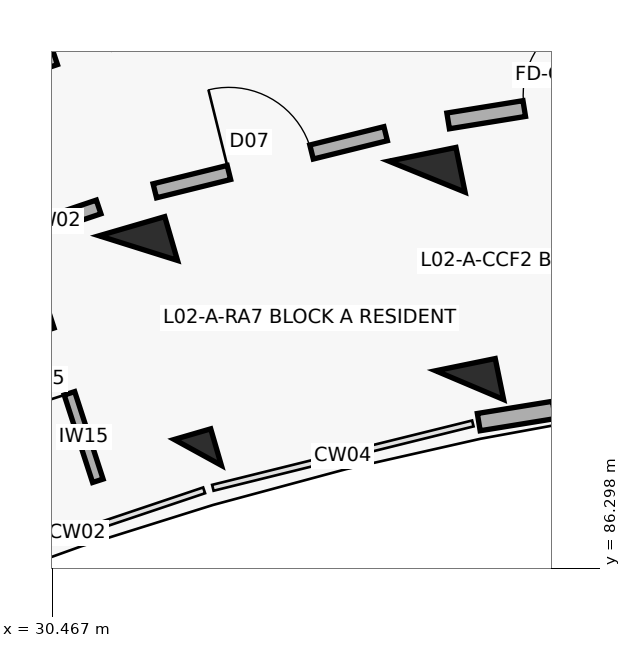
"""IFC4 building model, lengths in metres.
Left out: names, types, materials, properties, quantities, classifications, styles, units other than length and angle.
Written with IfcOpenShell. Run it as: python <this file> out.ifc"""

import sys

from ifc_helpers import new_model, si_unit, direction, frame, frame_2d, origin, origin_2d, place, context, subcontext, project, spatial, rectangle, extrude, element, fill, save


model = new_model("IFC4")
c1 = context("Model", 3, precision=1e-05, world=origin(), true_north=direction((0.0, 1.0)))
c2 = subcontext(c1, "Body", "Model", "MODEL_VIEW")
j1 = project(units=[si_unit("LENGTHUNIT", "METRE"), si_unit("PLANEANGLEUNIT", "RADIAN")], contexts=[c1])
p1 = place(None, origin())
s1 = spatial("IfcSite", under=j1, at=p1, CompositionType="ELEMENT")
p2 = place(p1, origin())
s2 = spatial("IfcBuilding", under=s1, at=p2, CompositionType="ELEMENT")
p3 = place(p2, frame((0.0, 0.0, 8.1)))
s3 = spatial("IfcBuildingStorey", under=s2, at=p3, CompositionType="ELEMENT", Elevation=8.1)
p4 = place(p3, frame((32.382, 87.82, 0.0), z_axis=(0.0, 0.0, 1.0), x_axis=(-0.27966144946, 0.96009867914, 0.0)))
e1 = element("IfcColumn", 1, at=p4, inside=s3, PredefinedType="COLUMN", context=c2, shape_type="SweptSolid", body=[
    extrude(rectangle(XDim=0.5, YDim=0.5, at=origin_2d()), origin(), (0.0, 0.0, 1.0), 3.1),
])
p5 = place(p3, frame((31.599, 90.508, 0.0), z_axis=(0.0, 0.0, 1.0), x_axis=(-0.27966144946, 0.96009867914, 0.0)))
e2 = element("IfcColumn", 2, at=p5, inside=s3, PredefinedType="COLUMN", context=c2, shape_type="SweptSolid", body=[
    extrude(rectangle(XDim=0.6, YDim=0.9, at=origin_2d()), origin(), (0.0, 0.0, 1.0), 3.1),
])
p6 = place(p3, frame((35.958, 88.705, 0.0), z_axis=(0.0, 0.0, 1.0), x_axis=(-0.200393999665, 0.979715389742, 0.0)))
e3 = element("IfcColumn", 3, at=p6, inside=s3, PredefinedType="COLUMN", context=c2, shape_type="SweptSolid", body=[
    extrude(rectangle(XDim=0.55, YDim=0.8, at=origin_2d()), origin(), (0.0, 0.0, 1.0), 3.1),
])
p7 = place(p3, frame((35.397, 91.448, 0.0), z_axis=(0.0, 0.0, 1.0), x_axis=(-0.200393999665, 0.979715389742, 0.0)))
e4 = element("IfcColumn", 4, at=p7, inside=s3, PredefinedType="COLUMN", context=c2, shape_type="SweptSolid", body=[
    extrude(rectangle(XDim=0.6, YDim=0.9, at=origin_2d()), origin(), (0.0, 0.0, 1.0), 3.1),
])
p8 = place(p3, frame((36.078, 88.218, 0.0), z_axis=(0.0, 0.0, 1.0), x_axis=(0.987080874485, 0.160222804952, 0.0)))
e5 = element("IfcWall", 5, at=p8, inside=s3, PredefinedType="SOLIDWALL", context=c2, shape_type="SweptSolid", body=[
    extrude(rectangle(XDim=3.604, YDim=0.23, at=frame_2d((1.802, 0.0))), origin(), (0.0, 0.0, 1.0), 2.25),
])
p9 = place(p8, frame((1.002, 0.0, 0.32)))
e6 = element("IfcOpeningElement", 6, at=p9, cuts=e5, PredefinedType="OPENING", context=c2, shape_type="SweptSolid", body=[
    extrude(rectangle(XDim=1.6, YDim=1.5, at=frame_2d((0.8, 0.75))), frame((0.0, 0.125, 0.0), z_axis=(0.0, -1.0, 0.0), x_axis=(1.0, 0.0, 0.0)), (0.0, 0.0, 1.0), 0.25),
])
p10 = place(p3, frame((27.247, 91.923, 0.0), z_axis=(0.0, 0.0, 1.0), x_axis=(0.947863007629, 0.318678080151, 0.0)))
e7 = element("IfcWall", 7, at=p10, inside=s3, PredefinedType="SOLIDWALL", context=c2, shape_type="SweptSolid", body=[
    extrude(rectangle(XDim=3.436, YDim=0.2, at=frame_2d((1.718, 0.0))), origin(), (0.0, 0.0, 1.0), 2.08),
])
p11 = place(p10, frame((1.228, 0.0, 0.0)))
e8 = element("IfcOpeningElement", 8, at=p11, cuts=e7, PredefinedType="OPENING", context=c2, shape_type="SweptSolid", body=[
    extrude(rectangle(XDim=0.98, YDim=2.15, at=frame_2d((0.49, 1.075))), frame((0.0, 0.11, 0.0), z_axis=(0.0, -1.0, 0.0), x_axis=(1.0, 0.0, 0.0)), (0.0, 0.0, 1.0), 0.22),
])
p12 = place(p3, frame((27.979, 90.008, 0.0), z_axis=(0.0, 0.0, 1.0), x_axis=(0.94787351033, 0.318646839643, 0.0)))
e9 = element("IfcWall", 9, at=p12, inside=s3, PredefinedType="SOLIDWALL", context=c2, shape_type="SweptSolid", body=[
    extrude(rectangle(XDim=3.269, YDim=0.19, at=frame_2d((1.634, 0.0))), origin(), (0.0, 0.0, 1.0), 2.08),
])
p13 = place(p12, frame((1.184, 0.0, 0.0)))
e10 = element("IfcOpeningElement", 10, at=p13, cuts=e9, PredefinedType="OPENING", context=c2, shape_type="SweptSolid", body=[
    extrude(rectangle(XDim=0.9, YDim=2.1, at=frame_2d((0.45, 1.05))), frame((0.0, 0.105, 0.0), z_axis=(0.0, -1.0, 0.0), x_axis=(1.0, 0.0, 0.0)), (0.0, 0.0, 1.0), 0.21),
])
p14 = place(p3, frame((31.066, 87.446, 0.0), z_axis=(0.0, 0.0, 1.0), x_axis=(-0.308582493915, 0.951197584337, 0.0)))
e11 = element("IfcWall", 11, at=p14, inside=s3, PredefinedType="PARTITIONING", context=c2, shape_type="SweptSolid", body=[
    extrude(rectangle(XDim=3.3, YDim=0.145, at=frame_2d((1.65, 0.0))), origin(), (0.0, 0.0, 1.0), 2.08),
])
p15 = place(p14, frame((1.21, 0.0, 0.0)))
e12 = element("IfcOpeningElement", 12, at=p15, cuts=e11, PredefinedType="OPENING", context=c2, shape_type="SweptSolid", body=[
    extrude(rectangle(XDim=0.88, YDim=2.1, at=frame_2d((0.44, 1.05))), frame((0.0, 0.083, 0.0), z_axis=(0.0, -1.0, 0.0), x_axis=(1.0, 0.0, 0.0)), (0.0, 0.0, 1.0), 0.165),
])
p16 = place(p3, frame((31.816, 91.262, 0.0), z_axis=(0.0, 0.0, 1.0), x_axis=(0.970727194092, 0.240184751078, 0.0)))
e13 = element("IfcWall", 13, at=p16, inside=s3, PredefinedType="SOLIDWALL", context=c2, shape_type="SweptSolid", body=[
    extrude(rectangle(XDim=3.129, YDim=0.19, at=frame_2d((1.564, 0.0))), origin(), (0.0, 0.0, 1.0), 2.08),
])
p17 = place(p16, frame((1.004, 0.0, 0.0)))
e14 = element("IfcOpeningElement", 14, at=p17, cuts=e13, PredefinedType="OPENING", context=c2, shape_type="SweptSolid", body=[
    extrude(rectangle(XDim=1.12, YDim=2.15, at=frame_2d((0.56, 1.075))), frame((0.0, 0.105, 0.0), z_axis=(0.0, -1.0, 0.0), x_axis=(1.0, 0.0, 0.0)), (0.0, 0.0, 1.0), 0.21),
])
p18 = place(p3, frame((35.676, 92.181, 0.0), z_axis=(0.0, 0.0, 1.0), x_axis=(0.98707079686, 0.160284877599, 0.0)))
e15 = element("IfcWall", 15, at=p18, inside=s3, PredefinedType="SOLIDWALL", context=c2, shape_type="SweptSolid", body=[
    extrude(rectangle(XDim=3.129, YDim=0.21, at=frame_2d((1.564, 0.0))), origin(), (0.0, 0.0, 1.0), 2.08),
])
p19 = place(p18, frame((1.014, 0.0, 0.0)))
e16 = element("IfcOpeningElement", 16, at=p19, cuts=e15, PredefinedType="OPENING", context=c2, shape_type="SweptSolid", body=[
    extrude(rectangle(XDim=1.1, YDim=2.15, at=frame_2d((0.55, 1.075))), frame((0.0, 0.115, 0.0), z_axis=(0.0, -1.0, 0.0), x_axis=(1.0, 0.0, 0.0)), (0.0, 0.0, 1.0), 0.23),
])
p20 = place(p15, origin())
e17 = element("IfcDoor", 17, at=p20, inside=s3, OperationType="SINGLE_SWING_LEFT", PredefinedType="DOOR", context=c2, shape_type="SweptSolid", body=[
    extrude(rectangle(XDim=0.88, YDim=2.1, at=frame_2d((0.44, 1.05))), frame((0.0, 0.025, 0.0), z_axis=(0.0, -1.0, 0.0), x_axis=(1.0, 0.0, 0.0)), (0.0, 0.0, 1.0), 0.05),
])
fill(e12, e17)
p21 = place(p17, origin())
e18 = element("IfcDoor", 18, at=p21, inside=s3, OperationType="SINGLE_SWING_LEFT", PredefinedType="DOOR", context=c2, shape_type="SweptSolid", body=[
    extrude(rectangle(XDim=1.12, YDim=2.15, at=frame_2d((0.56, 1.075))), frame((0.0, 0.025, 0.0), z_axis=(0.0, -1.0, 0.0), x_axis=(1.0, 0.0, 0.0)), (0.0, 0.0, 1.0), 0.05),
])
fill(e14, e18)
p22 = place(p19, origin())
e19 = element("IfcDoor", 19, at=p22, inside=s3, OperationType="SINGLE_SWING_RIGHT", PredefinedType="DOOR", context=c2, shape_type="SweptSolid", body=[
    extrude(rectangle(XDim=1.1, YDim=2.15, at=frame_2d((0.55, 1.075))), frame((0.0, 0.025, 0.0), z_axis=(0.0, -1.0, 0.0), x_axis=(1.0, 0.0, 0.0)), (0.0, 0.0, 1.0), 0.05),
])
fill(e16, e19)
save(model, sys.argv[1])
